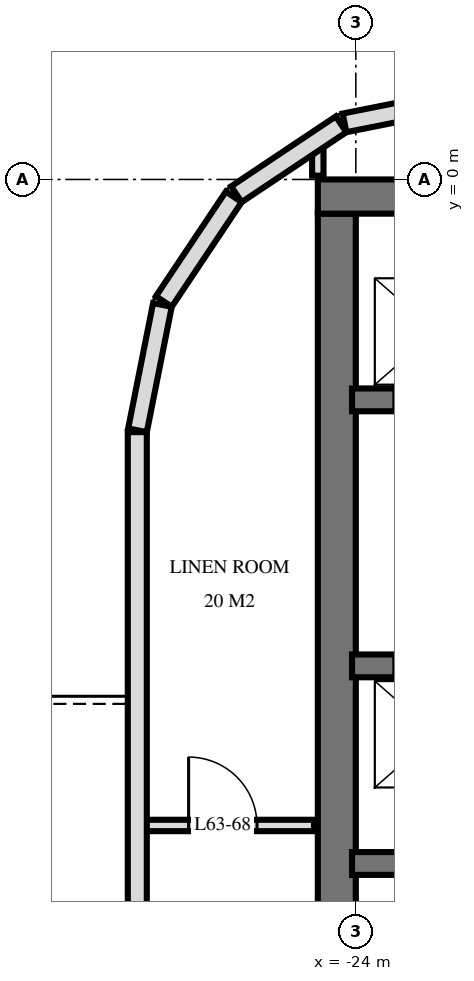
"""IFC4 building model, lengths in metres.
Left out: names, types, materials, properties, quantities, classifications, styles, units other than length and angle.
Written with IfcOpenShell. Run it as: python <this file> out.ifc"""

import sys

from ifc_helpers import new_model, si_unit, direction, frame, frame_2d, origin, place, context, subcontext, project, spatial, rectangle, extrude, element, fill, save


model = new_model("IFC4")
c1 = context("Model", 3, precision=1e-05, world=origin(), true_north=direction((0.0, 1.0)))
c2 = subcontext(c1, "Body", "Model", "MODEL_VIEW")
j1 = project(units=[si_unit("LENGTHUNIT", "METRE"), si_unit("PLANEANGLEUNIT", "RADIAN")], contexts=[c1])
p1 = place(None, origin())
s1 = spatial("IfcSite", under=j1, at=p1, CompositionType="ELEMENT")
p2 = place(p1, origin())
s2 = spatial("IfcBuilding", under=s1, at=p2, CompositionType="ELEMENT")
p3 = place(p2, frame((0.0, 0.0, 239.6)))
s3 = spatial("IfcBuildingStorey", under=s2, at=p3, CompositionType="ELEMENT", Elevation=239.6)
p4 = place(p3, frame((-24.5, -0.225, 0.0), z_axis=(0.0, 0.0, 1.0), x_axis=(1.0, 0.0, 0.0)))
e1 = element("IfcWall", 1, at=p4, inside=s3, PredefinedType="SHEAR", context=c2, shape_type="SweptSolid", body=[
    extrude(rectangle(XDim=14.5, YDim=0.45, at=frame_2d((7.25, 0.0))), origin(), (0.0, 0.0, 1.0), 3.5),
])
p5 = place(p3, frame((-24.25, -14.55, 0.0), z_axis=(0.0, 0.0, 1.0), x_axis=(0.0, 1.0, 0.0)))
e2 = element("IfcWall", 2, at=p5, inside=s3, PredefinedType="SHEAR", context=c2, shape_type="SweptSolid", body=[
    extrude(rectangle(XDim=14.1, YDim=0.5, at=frame_2d((7.05, 0.0))), origin(), (0.0, 0.0, 1.0), 3.5),
])
p6 = place(p3, frame((-24.05, -2.9, 0.0), z_axis=(0.0, 0.0, 1.0), x_axis=(1.0, 0.0, 0.0)))
e3 = element("IfcWall", 3, at=p6, inside=s3, PredefinedType="SHEAR", context=c2, shape_type="SweptSolid", body=[
    extrude(rectangle(XDim=13.7, YDim=0.3, at=frame_2d((6.85, 0.0))), origin(), (0.0, 0.0, 1.0), 3.5),
])
p7 = place(p6, frame((0.55, 0.0, 0.0)))
e4 = element("IfcOpeningElement", 4, at=p7, cuts=e3, PredefinedType="OPENING", context=c2, shape_type="SweptSolid", body=[
    extrude(rectangle(XDim=1.1, YDim=2.1, at=frame_2d((0.55, 1.05))), frame((0.0, 0.16, 0.0), z_axis=(0.0, -1.0, 0.0), x_axis=(1.0, 0.0, 0.0)), (0.0, 0.0, 1.0), 0.32),
])
p8 = place(p6, frame((6.613, 0.0, 0.0)))
e5 = element("IfcOpeningElement", 5, at=p8, cuts=e3, PredefinedType="OPENING", context=c2, shape_type="SweptSolid", body=[
    extrude(rectangle(XDim=0.9, YDim=2.1, at=frame_2d((0.45, 1.05))), frame((0.0, 0.16, 0.0), z_axis=(0.0, -1.0, 0.0), x_axis=(1.0, 0.0, 0.0)), (0.0, 0.0, 1.0), 0.32),
])
p9 = place(p6, frame((5.188, 0.0, 0.0)))
e6 = element("IfcOpeningElement", 6, at=p9, cuts=e3, PredefinedType="OPENING", context=c2, shape_type="SweptSolid", body=[
    extrude(rectangle(XDim=0.9, YDim=2.1, at=frame_2d((0.45, 1.05))), frame((0.0, 0.16, 0.0), z_axis=(0.0, -1.0, 0.0), x_axis=(1.0, 0.0, 0.0)), (0.0, 0.0, 1.0), 0.32),
])
p10 = place(p6, frame((12.562, 0.0, 0.0)))
e7 = element("IfcOpeningElement", 7, at=p10, cuts=e3, PredefinedType="OPENING", context=c2, shape_type="SweptSolid", body=[
    extrude(rectangle(XDim=1.0, YDim=2.1, at=frame_2d((0.5, 1.05))), frame((0.0, 0.16, 0.0), z_axis=(0.0, -1.0, 0.0), x_axis=(1.0, 0.0, 0.0)), (0.0, 0.0, 1.0), 0.32),
])
p11 = place(p6, frame((11.137, 0.0, 0.0)))
e8 = element("IfcOpeningElement", 8, at=p11, cuts=e3, PredefinedType="OPENING", context=c2, shape_type="SweptSolid", body=[
    extrude(rectangle(XDim=1.0, YDim=2.1, at=frame_2d((0.5, 1.05))), frame((0.0, 0.16, 0.0), z_axis=(0.0, -1.0, 0.0), x_axis=(1.0, 0.0, 0.0)), (0.0, 0.0, 1.0), 0.32),
])
p12 = place(p6, frame((8.85, 0.0, 0.0)))
e9 = element("IfcOpeningElement", 9, at=p12, cuts=e3, PredefinedType="OPENING", context=c2, shape_type="SweptSolid", body=[
    extrude(rectangle(XDim=1.0, YDim=2.1, at=frame_2d((0.5, 1.05))), frame((0.0, 0.16, 0.0), z_axis=(0.0, -1.0, 0.0), x_axis=(1.0, 0.0, 0.0)), (0.0, 0.0, 1.0), 0.32),
])
p13 = place(p6, frame((3.0, 0.0, 0.0)))
e10 = element("IfcOpeningElement", 10, at=p13, cuts=e3, PredefinedType="OPENING", context=c2, shape_type="SweptSolid", body=[
    extrude(rectangle(XDim=1.0, YDim=2.1, at=frame_2d((0.5, 1.05))), frame((0.0, 0.16, 0.0), z_axis=(0.0, -1.0, 0.0), x_axis=(1.0, 0.0, 0.0)), (0.0, 0.0, 1.0), 0.32),
])
p14 = place(p3, frame((-24.05, -6.4, 0.0), z_axis=(0.0, 0.0, 1.0), x_axis=(1.0, 0.0, 0.0)))
e11 = element("IfcWall", 11, at=p14, inside=s3, PredefinedType="SHEAR", context=c2, shape_type="SweptSolid", body=[
    extrude(rectangle(XDim=13.7, YDim=0.3, at=frame_2d((6.85, 0.0))), origin(), (0.0, 0.0, 1.0), 3.5),
])
p15 = place(p14, frame((0.55, 0.0, 0.0)))
e12 = element("IfcOpeningElement", 12, at=p15, cuts=e11, PredefinedType="OPENING", context=c2, shape_type="SweptSolid", body=[
    extrude(rectangle(XDim=1.1, YDim=2.1, at=frame_2d((0.55, 1.05))), frame((0.0, 0.16, 0.0), z_axis=(0.0, -1.0, 0.0), x_axis=(1.0, 0.0, 0.0)), (0.0, 0.0, 1.0), 0.32),
])
p16 = place(p14, frame((5.8, 0.0, 0.0)))
e13 = element("IfcOpeningElement", 13, at=p16, cuts=e11, PredefinedType="OPENING", context=c2, shape_type="SweptSolid", body=[
    extrude(rectangle(XDim=1.1, YDim=2.1, at=frame_2d((0.55, 1.05))), frame((0.0, 0.16, 0.0), z_axis=(0.0, -1.0, 0.0), x_axis=(1.0, 0.0, 0.0)), (0.0, 0.0, 1.0), 0.32),
])
p17 = place(p3, frame((-24.05, -9.0, 0.0), z_axis=(0.0, 0.0, 1.0), x_axis=(1.0, 0.0, 0.0)))
e14 = element("IfcWall", 14, at=p17, inside=s3, PredefinedType="SHEAR", context=c2, shape_type="SweptSolid", body=[
    extrude(rectangle(XDim=13.7, YDim=0.3, at=frame_2d((6.85, 0.0))), origin(), (0.0, 0.0, 1.0), 3.5),
])
p18 = place(p17, frame((8.8, 0.0, 0.0)))
e15 = element("IfcOpeningElement", 15, at=p18, cuts=e14, PredefinedType="OPENING", context=c2, shape_type="SweptSolid", body=[
    extrude(rectangle(XDim=1.1, YDim=2.1, at=frame_2d((0.55, 1.05))), frame((0.0, 0.16, 0.0), z_axis=(0.0, -1.0, 0.0), x_axis=(1.0, 0.0, 0.0)), (0.0, 0.0, 1.0), 0.32),
])
p19 = place(p3, frame((-22.5, 1.073, 0.0), z_axis=(0.0, 0.0, 1.0), x_axis=(-0.980803419081, -0.194999110559, 0.0)))
e16 = element("IfcWall", 16, at=p19, inside=s3, PredefinedType="SOLIDWALL", context=c2, shape_type="SweptSolid", body=[
    extrude(rectangle(XDim=1.681, YDim=0.25, at=frame_2d((0.841, 0.0))), origin(), (0.0, 0.0, 1.0), 3.22),
])
for number, where, z_axis, x_axis in (
    (17, (-24.194, 0.726, 0.0), (0.0, 0.0, 1.0), (-0.831, -0.556, 0.0)),
    (18, (-25.606, -0.229, 0.0), (0.0, 0.0, 1.0), (-0.556, -0.831, 0.0)),
):
    element("IfcWall", number, at=place(p3, frame(where, z_axis=z_axis, x_axis=x_axis)), inside=s3, PredefinedType="SOLIDWALL", context=c2, shape_type="SweptSolid", body=[
        extrude(rectangle(XDim=1.656, YDim=0.25, at=frame_2d((0.828, 0.0))), origin(), (0.0, 0.0, 1.0), 3.22),
    ])
p20 = place(p3, frame((-26.545, -1.651, 0.0), z_axis=(0.0, 0.0, 1.0), x_axis=(-0.194999110559, -0.980803419081, 0.0)))
e19 = element("IfcWall", 19, at=p20, inside=s3, PredefinedType="SOLIDWALL", context=c2, shape_type="SweptSolid", body=[
    extrude(rectangle(XDim=1.681, YDim=0.25, at=frame_2d((0.841, 0.0))), origin(), (0.0, 0.0, 1.0), 3.22),
])
p21 = place(p3, frame((-26.875, -3.325, 0.0), z_axis=(0.0, 0.0, 1.0), x_axis=(0.0, -1.0, 0.0)))
e20 = element("IfcWall", 20, at=p21, inside=s3, PredefinedType="SOLIDWALL", context=c2, shape_type="SweptSolid", body=[
    extrude(rectangle(XDim=21.551, YDim=0.25, at=frame_2d((10.775, 0.0))), origin(), (0.0, 0.0, 1.0), 3.22),
])
p22 = place(p21, frame((7.525, 0.0, 0.0)))
e21 = element("IfcOpeningElement", 21, at=p22, cuts=e20, PredefinedType="OPENING", context=c2, shape_type="SweptSolid", body=[
    extrude(rectangle(XDim=1.8, YDim=2.4, at=frame_2d((0.9, 1.2))), frame((0.0, 0.135, 0.0), z_axis=(0.0, -1.0, 0.0), x_axis=(1.0, 0.0, 0.0)), (0.0, 0.0, 1.0), 0.27),
])
p23 = place(p21, frame((12.275, 0.0, 0.9)))
e22 = element("IfcOpeningElement", 22, at=p23, cuts=e20, PredefinedType="OPENING", context=c2, shape_type="SweptSolid", body=[
    extrude(rectangle(XDim=1.2, YDim=1.5, at=frame_2d((0.6, 0.75))), frame((0.0, 0.135, 0.0), z_axis=(0.0, -1.0, 0.0), x_axis=(1.0, 0.0, 0.0)), (0.0, 0.0, 1.0), 0.27),
])
p24 = place(p21, frame((15.275, 0.0, 0.0)))
e23 = element("IfcOpeningElement", 23, at=p24, cuts=e20, PredefinedType="OPENING", context=c2, shape_type="SweptSolid", body=[
    extrude(rectangle(XDim=1.8, YDim=2.4, at=frame_2d((0.9, 1.2))), frame((0.0, 0.135, 0.0), z_axis=(0.0, -1.0, 0.0), x_axis=(1.0, 0.0, 0.0)), (0.0, 0.0, 1.0), 0.27),
])
p25 = place(p21, frame((18.875, 0.0, 0.0)))
e24 = element("IfcOpeningElement", 24, at=p25, cuts=e20, PredefinedType="OPENING", context=c2, shape_type="SweptSolid", body=[
    extrude(rectangle(XDim=1.8, YDim=2.4, at=frame_2d((0.9, 1.2))), frame((0.0, 0.135, 0.0), z_axis=(0.0, -1.0, 0.0), x_axis=(1.0, 0.0, 0.0)), (0.0, 0.0, 1.0), 0.27),
])
p26 = place(p3, frame((-24.5, 0.05, 0.0), z_axis=(0.0, 0.0, 1.0), x_axis=(0.0, 1.0, 0.0)))
e25 = element("IfcWall", 25, at=p26, inside=s3, PredefinedType="PARTITIONING", context=c2, shape_type="SweptSolid", body=[
    extrude(rectangle(XDim=0.405, YDim=0.15, at=frame_2d((0.203, 0.0))), origin(), (0.0, 0.0, 1.0), 3.22),
])
p27 = place(p3, frame((-26.82, -8.5, 0.0), z_axis=(0.0, 0.0, 1.0), x_axis=(1.0, 0.0, 0.0)))
e26 = element("IfcWall", 26, at=p27, inside=s3, PredefinedType="PARTITIONING", context=c2, shape_type="SweptSolid", body=[
    extrude(rectangle(XDim=2.27, YDim=0.15, at=frame_2d((1.135, 0.0))), origin(), (0.0, 0.0, 1.0), 3.22),
])
p28 = place(p27, frame((0.62, 0.0, 0.0)))
e27 = element("IfcOpeningElement", 27, at=p28, cuts=e26, PredefinedType="OPENING", context=c2, shape_type="SweptSolid", body=[
    extrude(rectangle(XDim=0.9, YDim=2.1, at=frame_2d((0.45, 1.05))), frame((0.0, 0.085, 0.0), z_axis=(0.0, -1.0, 0.0), x_axis=(1.0, 0.0, 0.0)), (0.0, 0.0, 1.0), 0.17),
])
p29 = place(p28, origin())
e28 = element("IfcDoor", 28, at=p29, inside=s3, OperationType="SINGLE_SWING_RIGHT", PredefinedType="DOOR", context=c2, shape_type="SweptSolid", body=[
    extrude(rectangle(XDim=0.9, YDim=2.1, at=frame_2d((0.45, 1.05))), frame((0.0, 0.025, 0.0), z_axis=(0.0, -1.0, 0.0), x_axis=(1.0, 0.0, 0.0)), (0.0, 0.0, 1.0), 0.05),
])
fill(e27, e28)
save(model, sys.argv[1])
